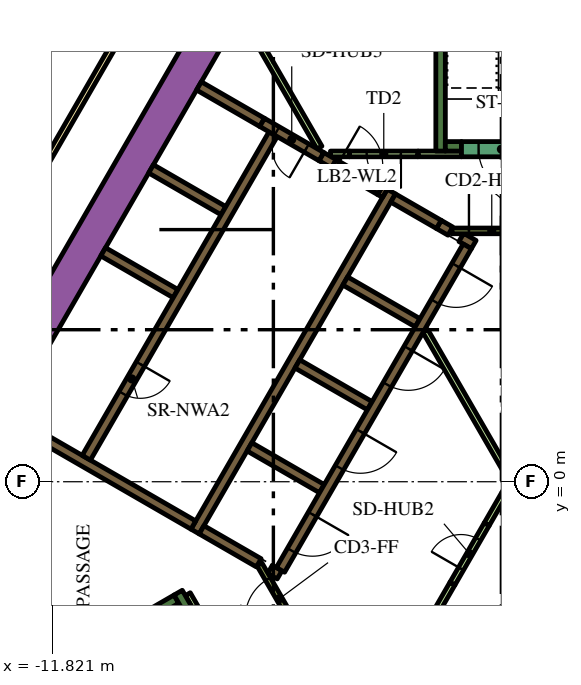
"""IFC4 building model, lengths in metres.
Left out: names, types, materials, properties, quantities, classifications, styles, units other than length and angle.
Written with IfcOpenShell. Run it as: python <this file> out.ifc"""

import sys

from ifc_helpers import new_model, si_unit, direction, frame, frame_2d, origin, place, context, subcontext, project, spatial, polyline, rectangle, outline, extrude, element, fill, save


model = new_model("IFC4")
c1 = context("Model", 3, precision=1e-05, world=origin(), true_north=direction((0.0, 1.0)))
c2 = subcontext(c1, "Body", "Model", "MODEL_VIEW")
j1 = project(units=[si_unit("LENGTHUNIT", "METRE"), si_unit("PLANEANGLEUNIT", "RADIAN")], contexts=[c1])
p1 = place(None, origin())
s1 = spatial("IfcSite", under=j1, at=p1, CompositionType="ELEMENT")
p2 = place(p1, origin())
s2 = spatial("IfcBuilding", under=s1, at=p2, CompositionType="ELEMENT")
p3 = place(p2, frame((0.0, 0.0, 122.7)))
s3 = spatial("IfcBuildingStorey", under=s2, at=p3, CompositionType="ELEMENT", Elevation=122.7)
p4 = place(p3, frame((-15.36, -1.503, 0.0), z_axis=(0.0, 0.0, 1.0), x_axis=(0.50000389221, 0.866023156604, 0.0)))
e1 = element("IfcWall", 1, at=p4, inside=s3, PredefinedType="SOLIDWALL", context=c2, shape_type="SweptSolid", body=[
    extrude(rectangle(XDim=21.0, YDim=0.9, at=frame_2d((10.5, 0.0))), origin(), (0.0, 0.0, 1.0), 3.9),
])
p5 = place(p3, frame((-1.6, 8.7, 0.0), z_axis=(0.0, 0.0, 1.0), x_axis=(0.0, 1.0, 0.0)))
e2 = element("IfcWall", 2, at=p5, inside=s3, PredefinedType="SOLIDWALL", context=c2, shape_type="SweptSolid", body=[
    extrude(rectangle(XDim=7.05, YDim=0.25, at=frame_2d((3.525, 0.0))), origin(), (0.0, 0.0, 1.0), 3.9),
])
p6 = place(p3, frame((-1.475, 8.825, 0.0), z_axis=(0.0, 0.0, 1.0), x_axis=(1.0, 0.0, 0.0)))
e3 = element("IfcWall", 3, at=p6, inside=s3, PredefinedType="SOLIDWALL", context=c2, shape_type="SweptSolid", body=[
    extrude(rectangle(XDim=0.425, YDim=0.25, at=frame_2d((0.212, 0.0))), origin(), (0.0, 0.0, 1.0), 3.9),
])
p7 = place(p3, frame((-14.44, -6.49, 0.0), z_axis=(0.0, 0.0, 1.0), x_axis=(0.866022966069, 0.500004222222, 0.0)))
e4 = element("IfcWall", 4, at=p7, inside=s3, PredefinedType="SOLIDWALL", context=c2, shape_type="SweptSolid", body=[
    extrude(rectangle(XDim=6.8, YDim=0.25, at=frame_2d((3.4, 0.0))), origin(), (0.0, 0.0, 1.0), 3.9),
])
p8 = place(p3, frame((-8.168, -3.503, 0.0), z_axis=(0.0, 0.0, 1.0), x_axis=(-0.499952099219, 0.866053057547, 0.0)))
e5 = element("IfcWall", 5, at=p8, inside=s3, PredefinedType="SOLIDWALL", context=c2, shape_type="SweptSolid", body=[
    extrude(rectangle(XDim=0.675, YDim=0.25, at=frame_2d((0.337, 0.0))), origin(), (0.0, 0.0, 1.0), 3.9),
])
p9 = place(p3, frame((-8.06, -1.311, 0.0), z_axis=(0.0, 0.0, 1.0), x_axis=(0.50000273126, 0.866023826885, 0.0)))
e6 = element("IfcWall", 6, at=p9, inside=s3, PredefinedType="SOLIDWALL", context=c2, shape_type="SweptSolid", body=[
    extrude(rectangle(XDim=10.33, YDim=0.25, at=frame_2d((5.165, 0.0))), origin(), (0.0, 0.0, 1.0), 3.9),
])
p10 = place(p3, frame((-1.342, 6.595, 0.0), z_axis=(0.0, 0.0, 1.0), x_axis=(-0.866046247233, 0.49996389635, 0.0)))
e7 = element("IfcWall", 7, at=p10, inside=s3, PredefinedType="SOLIDWALL", context=c2, shape_type="SweptSolid", body=[
    extrude(rectangle(XDim=0.35, YDim=0.25, at=frame_2d((0.175, 0.0))), origin(), (0.0, 0.0, 1.0), 3.9),
])
p11 = place(p3, frame((-1.647, 6.771, 0.0), z_axis=(0.0, 0.0, 1.0), x_axis=(-0.865971728693, 0.500092956464, 0.0)))
e8 = element("IfcWall", 8, at=p11, inside=s3, PredefinedType="SOLIDWALL", context=c2, shape_type="SweptSolid", body=[
    extrude(rectangle(XDim=1.388, YDim=0.25, at=frame_2d((0.694, 0.0))), origin(), (0.0, 0.0, 1.0), 3.9),
])
p12 = place(p3, frame((-0.728, 6.24, 0.0), z_axis=(0.0, 0.0, 1.0), x_axis=(-0.866088799389, 0.499890179513, 0.0)))
e9 = element("IfcWall", 9, at=p12, inside=s3, PredefinedType="SOLIDWALL", context=c2, shape_type="SweptSolid", body=[
    extrude(rectangle(XDim=0.378, YDim=0.25, at=frame_2d((0.189, 0.0))), origin(), (0.0, 0.0, 1.0), 3.9),
])
for number, where, z_axis, x_axis in (
    (10, (-2.204, 4.182, 0.0), (0.0, 0.0, 1.0), (-0.866, 0.5, 0.0)),
    (11, (-5.369, 3.1, 0.0), (0.0, 0.0, 1.0), (0.866, -0.5, 0.0)),
    (12, (-4.724, -0.182, 0.0), (0.0, 0.0, 1.0), (-0.866, 0.5, 0.0)),
):
    element("IfcWall", number, at=place(p3, frame(where, z_axis=z_axis, x_axis=x_axis)), inside=s3, PredefinedType="SOLIDWALL", context=c2, shape_type="SweptSolid", body=[
        extrude(rectangle(XDim=2.2, YDim=0.25, at=frame_2d((1.1, 0.0))), origin(), (0.0, 0.0, 1.0), 3.9),
    ])
p13 = place(p3, frame((-6.088, -2.305, 0.0), z_axis=(0.0, 0.0, 1.0), x_axis=(0.866059450854, -0.499941024108, 0.0)))
e13 = element("IfcWall", 13, at=p13, inside=s3, PredefinedType="SOLIDWALL", context=c2, shape_type="SweptSolid", body=[
    extrude(rectangle(XDim=0.29, YDim=0.25, at=frame_2d((0.145, 0.0))), origin(), (0.0, 0.0, 1.0), 3.9),
])
p14 = place(p3, frame((-7.889, -1.265, 0.0), z_axis=(0.0, 0.0, 1.0), x_axis=(0.865986741702, -0.500066958712, 0.0)))
e14 = element("IfcWall", 14, at=p14, inside=s3, PredefinedType="SOLIDWALL", context=c2, shape_type="SweptSolid", body=[
    extrude(rectangle(XDim=1.738, YDim=0.25, at=frame_2d((0.869, 0.0))), origin(), (0.0, 0.0, 1.0), 3.9),
])
p15 = place(p3, frame((-8.106, -1.14, 0.0), z_axis=(0.0, 0.0, 1.0), x_axis=(-0.866000643155, 0.500042884217, 0.0)))
e15 = element("IfcWall", 15, at=p15, inside=s3, PredefinedType="SOLIDWALL", context=c2, shape_type="SweptSolid", body=[
    extrude(rectangle(XDim=5.65, YDim=0.25, at=frame_2d((2.825, 0.0))), origin(), (0.0, 0.0, 1.0), 3.9),
])
p16 = place(p3, origin())
e16 = element("IfcWall", 16, at=p16, inside=s3, PredefinedType="SOLIDWALL", context=c2, shape_type="SweptSolid", body=[
    extrude(outline(polyline([(-3.128, 7.481), (-3.259, 7.557), (-3.134, 7.773), (-3.003, 7.698), (-3.128, 7.481)])), origin(), (0.0, 0.0, 1.0), 3.9),
])
for number, where, z_axis, x_axis in (
    (17, (-8.574, 4.95, 0.0), (0.0, 0.0, 1.0), (-0.866, 0.5, 0.0)),
    (18, (-7.314, 7.132, 0.0), (0.0, 0.0, 1.0), (-0.866, 0.5, 0.0)),
):
    element("IfcWall", number, at=place(p3, frame(where, z_axis=z_axis, x_axis=x_axis)), inside=s3, PredefinedType="SOLIDWALL", context=c2, shape_type="SweptSolid", body=[
        extrude(rectangle(XDim=2.2, YDim=0.25, at=frame_2d((1.1, 0.0))), origin(), (0.0, 0.0, 1.0), 3.9),
    ])
p17 = place(p3, frame((-6.296, 9.455, 0.0), z_axis=(0.0, 0.0, 1.0), x_axis=(-0.866011930837, 0.500023335103, 0.0)))
e19 = element("IfcWall", 19, at=p17, inside=s3, PredefinedType="SOLIDWALL", context=c2, shape_type="SweptSolid", body=[
    extrude(rectangle(XDim=1.92, YDim=0.25, at=frame_2d((0.96, 0.0))), origin(), (0.0, 0.0, 1.0), 3.9),
])
p18 = place(p3, frame((-4.409, 8.365, 0.0), z_axis=(0.0, 0.0, 1.0), x_axis=(-0.866057014183, 0.499945245186, 0.0)))
e20 = element("IfcWall", 20, at=p18, inside=s3, PredefinedType="SOLIDWALL", context=c2, shape_type="SweptSolid", body=[
    extrude(rectangle(XDim=0.379, YDim=0.25, at=frame_2d((0.19, 0.0))), origin(), (0.0, 0.0, 1.0), 3.9),
])
p19 = place(p3, frame((-1.887, -3.718, 0.0), z_axis=(0.0, 0.0, 1.0), x_axis=(0.500057179532, 0.865992388649, 0.0)))
e21 = element("IfcWall", 21, at=p19, inside=s3, PredefinedType="PARTITIONING", context=c2, shape_type="SweptSolid", body=[
    extrude(rectangle(XDim=1.199, YDim=0.15, at=frame_2d((0.6, 0.0))), origin(), (0.0, 0.0, 1.0), 2.75),
])
p20 = place(p3, frame((-8.252, -2.958, 0.0), z_axis=(0.0, 0.0, 1.0), x_axis=(0.500174715838, -0.865924508047, 0.0)))
e22 = element("IfcWall", 22, at=p20, inside=s3, PredefinedType="PARTITIONING", context=c2, shape_type="SweptSolid", body=[
    extrude(rectangle(XDim=0.514, YDim=0.15, at=frame_2d((0.257, 0.0))), origin(), (0.0, 0.0, 1.0), 2.75),
])
p21 = place(p3, frame((-2.195, 8.625, 0.0), z_axis=(0.0, 0.0, 1.0), x_axis=(1.0, 0.0, 0.0)))
e23 = element("IfcWall", 23, at=p21, inside=s3, PredefinedType="PARTITIONING", context=c2, shape_type="SweptSolid", body=[
    extrude(rectangle(XDim=1.145, YDim=0.15, at=frame_2d((0.573, 0.0))), origin(), (0.0, 0.0, 1.0), 2.75),
])
p22 = place(p3, frame((-6.823, 12.318, 0.0), z_axis=(0.0, 0.0, 1.0), x_axis=(0.500007885066, -0.866020851292, 0.0)))
e24 = element("IfcWall", 24, at=p22, inside=s3, PredefinedType="PARTITIONING", context=c2, shape_type="SweptSolid", body=[
    extrude(rectangle(XDim=4.072, YDim=0.15, at=frame_2d((2.036, 0.0))), origin(), (0.0, 0.0, 1.0), 2.75),
])
p23 = place(p3, frame((-4.498, 8.625, 0.0), z_axis=(0.0, 0.0, 1.0), x_axis=(1.0, 0.0, 0.0)))
e25 = element("IfcWall", 25, at=p23, inside=s3, PredefinedType="PARTITIONING", context=c2, shape_type="SweptSolid", body=[
    extrude(rectangle(XDim=0.502, YDim=0.15, at=frame_2d((0.251, 0.0))), origin(), (0.0, 0.0, 1.0), 2.75),
])
p24 = place(p3, frame((2.435, -3.718, 0.0), z_axis=(0.0, 0.0, 1.0), x_axis=(-0.499985176046, 0.866033962229, 0.0)))
e26 = element("IfcWall", 26, at=p24, inside=s3, PredefinedType="PARTITIONING", context=c2, shape_type="SweptSolid", body=[
    extrude(rectangle(XDim=8.875, YDim=0.15, at=frame_2d((4.438, 0.0))), origin(), (0.0, 0.0, 1.0), 2.75),
])
p25 = place(p3, frame((-0.387, -1.121, 0.0), z_axis=(0.0, 0.0, 1.0), x_axis=(0.500057179532, 0.865992388649, 0.0)))
e27 = element("IfcWall", 27, at=p25, inside=s3, PredefinedType="PARTITIONING", context=c2, shape_type="SweptSolid", body=[
    extrude(rectangle(XDim=1.199, YDim=0.15, at=frame_2d((0.6, 0.0))), origin(), (0.0, 0.0, 1.0), 2.75),
])
p26 = place(p3, frame((-6.008, 9.144, 0.0), z_axis=(0.0, 0.0, 1.0), x_axis=(-0.500006956611, -0.866021387346, 0.0)))
e28 = element("IfcWall", 28, at=p26, inside=s3, PredefinedType="SOLIDWALL", context=c2, shape_type="SweptSolid", body=[
    extrude(rectangle(XDim=9.83, YDim=0.25, at=frame_2d((4.915, 0.0))), origin(), (0.0, 0.0, 1.0), 3.9),
])
p27 = place(p26, frame((6.985, 0.0, 0.0)))
e29 = element("IfcOpeningElement", 29, at=p27, cuts=e28, PredefinedType="OPENING", context=c2, shape_type="SweptSolid", body=[
    extrude(rectangle(XDim=0.9, YDim=2.1, at=frame_2d((0.45, 1.05))), frame((0.0, 0.135, 0.0), z_axis=(0.0, -1.0, 0.0), x_axis=(1.0, 0.0, 0.0)), (0.0, 0.0, 1.0), 0.27),
])
p28 = place(p3, frame((-0.898, 6.194, 0.0), z_axis=(0.0, 0.0, 1.0), x_axis=(-0.499996202215, -0.866027596426, 0.0)))
e30 = element("IfcWall", 30, at=p28, inside=s3, PredefinedType="SOLIDWALL", context=c2, shape_type="SweptSolid", body=[
    extrude(rectangle(XDim=9.83, YDim=0.25, at=frame_2d((4.915, 0.0))), origin(), (0.0, 0.0, 1.0), 3.9),
])
p29 = place(p28, frame((0.585, 0.0, 0.0)))
e31 = element("IfcOpeningElement", 31, at=p29, cuts=e30, PredefinedType="OPENING", context=c2, shape_type="SweptSolid", body=[
    extrude(rectangle(XDim=1.1, YDim=2.1, at=frame_2d((0.55, 1.05))), frame((0.0, 0.135, 0.0), z_axis=(0.0, -1.0, 0.0), x_axis=(1.0, 0.0, 0.0)), (0.0, 0.0, 1.0), 0.27),
])
p30 = place(p28, frame((3.105, 0.0, 0.0)))
e32 = element("IfcOpeningElement", 32, at=p30, cuts=e30, PredefinedType="OPENING", context=c2, shape_type="SweptSolid", body=[
    extrude(rectangle(XDim=1.1, YDim=2.1, at=frame_2d((0.55, 1.05))), frame((0.0, 0.135, 0.0), z_axis=(0.0, -1.0, 0.0), x_axis=(1.0, 0.0, 0.0)), (0.0, 0.0, 1.0), 0.27),
])
p31 = place(p28, frame((5.625, 0.0, 0.0)))
e33 = element("IfcOpeningElement", 33, at=p31, cuts=e30, PredefinedType="OPENING", context=c2, shape_type="SweptSolid", body=[
    extrude(rectangle(XDim=1.1, YDim=2.1, at=frame_2d((0.55, 1.05))), frame((0.0, 0.135, 0.0), z_axis=(0.0, -1.0, 0.0), x_axis=(1.0, 0.0, 0.0)), (0.0, 0.0, 1.0), 0.27),
])
p32 = place(p28, frame((8.145, 0.0, 0.0)))
e34 = element("IfcOpeningElement", 34, at=p32, cuts=e30, PredefinedType="OPENING", context=c2, shape_type="SweptSolid", body=[
    extrude(rectangle(XDim=1.1, YDim=2.1, at=frame_2d((0.55, 1.05))), frame((0.0, 0.135, 0.0), z_axis=(0.0, -1.0, 0.0), x_axis=(1.0, 0.0, 0.0)), (0.0, 0.0, 1.0), 0.27),
])
p33 = place(p3, frame((1.05, 8.75, 0.0), z_axis=(0.0, 0.0, 1.0), x_axis=(-1.0, 0.0, 0.0)))
e35 = element("IfcWall", 35, at=p33, inside=s3, PredefinedType="SOLIDWALL", context=c2, shape_type="SweptSolid", body=[
    extrude(rectangle(XDim=2.1, YDim=0.4, at=frame_2d((1.05, 0.0))), origin(), (0.0, 0.0, 1.0), 3.9),
])
p34 = place(p33, frame((0.45, 0.0, 0.0)))
e36 = element("IfcOpeningElement", 36, at=p34, cuts=e35, PredefinedType="OPENING", context=c2, shape_type="SweptSolid", body=[
    extrude(rectangle(XDim=1.2, YDim=2.1, at=frame_2d((0.6, 1.05))), frame((0.0, 0.21, 0.0), z_axis=(0.0, -1.0, 0.0), x_axis=(1.0, 0.0, 0.0)), (0.0, 0.0, 1.0), 0.42),
])
p35 = place(p3, frame((-2.195, 8.625, 0.0), z_axis=(0.0, 0.0, 1.0), x_axis=(-1.0, 0.0, 0.0)))
e37 = element("IfcWall", 37, at=p35, inside=s3, PredefinedType="PARTITIONING", context=c2, shape_type="SweptSolid", body=[
    extrude(rectangle(XDim=1.8, YDim=0.15, at=frame_2d((0.9, 0.0))), origin(), (0.0, 0.0, 1.0), 2.75),
])
p36 = place(p35, frame((0.45, 0.0, 0.0)))
e38 = element("IfcOpeningElement", 38, at=p36, cuts=e37, PredefinedType="OPENING", context=c2, shape_type="SweptSolid", body=[
    extrude(rectangle(XDim=0.9, YDim=2.1, at=frame_2d((0.45, 1.05))), frame((0.0, 0.085, 0.0), z_axis=(0.0, -1.0, 0.0), x_axis=(1.0, 0.0, 0.0)), (0.0, 0.0, 1.0), 0.17),
])
p37 = place(p3, frame((-1.303, 6.6, 0.0), z_axis=(0.0, 0.0, 1.0), x_axis=(1.0, 0.0, 0.0)))
e39 = element("IfcWall", 39, at=p37, inside=s3, PredefinedType="PARTITIONING", context=c2, shape_type="SweptSolid", body=[
    extrude(rectangle(XDim=2.1, YDim=0.15, at=frame_2d((1.05, 0.0))), origin(), (0.0, 0.0, 1.0), 3.9),
])
p38 = place(p37, frame((0.45, 0.0, 0.0)))
e40 = element("IfcOpeningElement", 40, at=p38, cuts=e39, PredefinedType="OPENING", context=c2, shape_type="SweptSolid", body=[
    extrude(rectangle(XDim=1.2, YDim=2.1, at=frame_2d((0.6, 1.05))), frame((0.0, 0.085, 0.0), z_axis=(0.0, -1.0, 0.0), x_axis=(1.0, 0.0, 0.0)), (0.0, 0.0, 1.0), 0.17),
])
p39 = place(p3, frame((-5.317, -3.99, 0.0), z_axis=(0.0, 0.0, 1.0), x_axis=(-0.500027713859, 0.866009402589, 0.0)))
e41 = element("IfcWall", 41, at=p39, inside=s3, PredefinedType="PARTITIONING", context=c2, shape_type="SweptSolid", body=[
    extrude(rectangle(XDim=2.1, YDim=0.15, at=frame_2d((1.05, 0.0))), origin(), (0.0, 0.0, 1.0), 3.9),
])
p40 = place(p39, frame((0.45, 0.0, 0.0)))
e42 = element("IfcOpeningElement", 42, at=p40, cuts=e41, PredefinedType="OPENING", context=c2, shape_type="SweptSolid", body=[
    extrude(rectangle(XDim=1.2, YDim=2.1, at=frame_2d((0.6, 1.05))), frame((0.0, 0.085, 0.0), z_axis=(0.0, -1.0, 0.0), x_axis=(1.0, 0.0, 0.0)), (0.0, 0.0, 1.0), 0.17),
])
p41 = place(p3, frame((-4.409, 8.365, 0.0), z_axis=(0.0, 0.0, 1.0), x_axis=(0.866034573852, -0.49998411664, 0.0)))
e43 = element("IfcWall", 43, at=p41, inside=s3, PredefinedType="SOLIDWALL", context=c2, shape_type="SweptSolid", body=[
    extrude(rectangle(XDim=1.4, YDim=0.25, at=frame_2d((0.7, 0.0))), origin(), (0.0, 0.0, 1.0), 3.9),
])
p42 = place(p41, frame((0.1, 0.0, 0.0)))
e44 = element("IfcOpeningElement", 44, at=p42, cuts=e43, PredefinedType="OPENING", context=c2, shape_type="SweptSolid", body=[
    extrude(rectangle(XDim=1.2, YDim=2.1, at=frame_2d((0.6, 1.05))), frame((0.0, 0.135, 0.0), z_axis=(0.0, -1.0, 0.0), x_axis=(1.0, 0.0, 0.0)), (0.0, 0.0, 1.0), 0.27),
])
p43 = place(p3, frame((-1.287, -2.679, 0.0), z_axis=(0.0, 0.0, 1.0), x_axis=(0.499961193289, 0.866047807691, 0.0)))
e45 = element("IfcWall", 45, at=p43, inside=s3, PredefinedType="PARTITIONING", context=c2, shape_type="SweptSolid", body=[
    extrude(rectangle(XDim=1.8, YDim=0.15, at=frame_2d((0.9, 0.0))), origin(), (0.0, 0.0, 1.0), 2.75),
])
p44 = place(p43, frame((0.45, 0.0, 0.0)))
e46 = element("IfcOpeningElement", 46, at=p44, cuts=e45, PredefinedType="OPENING", context=c2, shape_type="SweptSolid", body=[
    extrude(rectangle(XDim=0.9, YDim=2.1, at=frame_2d((0.45, 1.05))), frame((0.0, 0.085, 0.0), z_axis=(0.0, -1.0, 0.0), x_axis=(1.0, 0.0, 0.0)), (0.0, 0.0, 1.0), 0.17),
])
p45 = place(p3, frame((-4.737, 8.555, 0.0), z_axis=(0.0, 0.0, 1.0), x_axis=(-0.865989075817, 0.500062916607, 0.0)))
e47 = element("IfcWall", 47, at=p45, inside=s3, PredefinedType="SOLIDWALL", context=c2, shape_type="SweptSolid", body=[
    extrude(rectangle(XDim=1.8, YDim=0.25, at=frame_2d((0.9, 0.0))), origin(), (0.0, 0.0, 1.0), 3.9),
])
p46 = place(p45, frame((0.45, 0.0, 0.0)))
e48 = element("IfcOpeningElement", 48, at=p46, cuts=e47, PredefinedType="OPENING", context=c2, shape_type="SweptSolid", body=[
    extrude(rectangle(XDim=0.9, YDim=2.1, at=frame_2d((0.45, 1.05))), frame((0.0, 0.135, 0.0), z_axis=(0.0, -1.0, 0.0), x_axis=(1.0, 0.0, 0.0)), (0.0, 0.0, 1.0), 0.27),
])
p47 = place(p3, frame((-19.081, -3.9, 0.0), z_axis=(0.0, 0.0, 1.0), x_axis=(0.499998313975, 0.866026377209, 0.0)))
e49 = element("IfcWall", 49, at=p47, inside=s3, PredefinedType="PARTITIONING", context=c2, shape_type="SweptSolid", body=[
    extrude(rectangle(XDim=25.766, YDim=0.15, at=frame_2d((12.883, 0.0))), origin(), (0.0, 0.0, 1.0), 2.75),
])
p48 = place(p47, frame((19.306, 0.0, 0.0)))
e50 = element("IfcOpeningElement", 50, at=p48, cuts=e49, PredefinedType="OPENING", context=c2, shape_type="SweptSolid", body=[
    extrude(rectangle(XDim=1.0, YDim=2.1, at=frame_2d((0.5, 1.05))), frame((0.0, 0.085, 0.0), z_axis=(0.0, -1.0, 0.0), x_axis=(1.0, 0.0, 0.0)), (0.0, 0.0, 1.0), 0.17),
])
p49 = place(p47, frame((18.0, 0.0, 0.0)))
e51 = element("IfcOpeningElement", 51, at=p49, cuts=e49, PredefinedType="OPENING", context=c2, shape_type="SweptSolid", body=[
    extrude(rectangle(XDim=1.0, YDim=2.1, at=frame_2d((0.5, 1.05))), frame((0.0, 0.085, 0.0), z_axis=(0.0, -1.0, 0.0), x_axis=(1.0, 0.0, 0.0)), (0.0, 0.0, 1.0), 0.17),
])
p50 = place(p47, frame((7.793, 0.0, 0.0)))
e52 = element("IfcOpeningElement", 52, at=p50, cuts=e49, PredefinedType="OPENING", context=c2, shape_type="SweptSolid", body=[
    extrude(rectangle(XDim=0.9, YDim=2.1, at=frame_2d((0.45, 1.05))), frame((0.0, 0.085, 0.0), z_axis=(0.0, -1.0, 0.0), x_axis=(1.0, 0.0, 0.0)), (0.0, 0.0, 1.0), 0.17),
])
p51 = place(p47, frame((4.674, 0.0, 0.0)))
e53 = element("IfcOpeningElement", 53, at=p51, cuts=e49, PredefinedType="OPENING", context=c2, shape_type="SweptSolid", body=[
    extrude(rectangle(XDim=0.9, YDim=2.1, at=frame_2d((0.45, 1.05))), frame((0.0, 0.085, 0.0), z_axis=(0.0, -1.0, 0.0), x_axis=(1.0, 0.0, 0.0)), (0.0, 0.0, 1.0), 0.17),
])
p52 = place(p47, frame((0.18, 0.0, 0.0)))
e54 = element("IfcOpeningElement", 54, at=p52, cuts=e49, PredefinedType="OPENING", context=c2, shape_type="SweptSolid", body=[
    extrude(rectangle(XDim=1.0, YDim=2.1, at=frame_2d((0.5, 1.05))), frame((0.0, 0.085, 0.0), z_axis=(0.0, -1.0, 0.0), x_axis=(1.0, 0.0, 0.0)), (0.0, 0.0, 1.0), 0.17),
])
p53 = place(p27, origin())
e55 = element("IfcDoor", 55, at=p53, inside=s3, OperationType="SINGLE_SWING_LEFT", PredefinedType="DOOR", context=c2, shape_type="SweptSolid", body=[
    extrude(rectangle(XDim=0.9, YDim=2.1, at=frame_2d((0.45, 1.05))), frame((0.0, 0.025, 0.0), z_axis=(0.0, -1.0, 0.0), x_axis=(1.0, 0.0, 0.0)), (0.0, 0.0, 1.0), 0.05),
])
fill(e29, e55)
p54 = place(p29, origin())
e56 = element("IfcDoor", 56, at=p54, inside=s3, OperationType="DOUBLE_DOOR_SLIDING", PredefinedType="DOOR", context=c2, shape_type="SweptSolid", body=[
    extrude(rectangle(XDim=1.1, YDim=2.1, at=frame_2d((0.55, 1.05))), frame((0.0, 0.025, 0.0), z_axis=(0.0, -1.0, 0.0), x_axis=(1.0, 0.0, 0.0)), (0.0, 0.0, 1.0), 0.05),
])
fill(e31, e56)
p55 = place(p30, origin())
e57 = element("IfcDoor", 57, at=p55, inside=s3, OperationType="DOUBLE_DOOR_SLIDING", PredefinedType="DOOR", context=c2, shape_type="SweptSolid", body=[
    extrude(rectangle(XDim=1.1, YDim=2.1, at=frame_2d((0.55, 1.05))), frame((0.0, 0.025, 0.0), z_axis=(0.0, -1.0, 0.0), x_axis=(1.0, 0.0, 0.0)), (0.0, 0.0, 1.0), 0.05),
])
fill(e32, e57)
p56 = place(p31, origin())
e58 = element("IfcDoor", 58, at=p56, inside=s3, OperationType="DOUBLE_DOOR_SLIDING", PredefinedType="DOOR", context=c2, shape_type="SweptSolid", body=[
    extrude(rectangle(XDim=1.1, YDim=2.1, at=frame_2d((0.55, 1.05))), frame((0.0, 0.025, 0.0), z_axis=(0.0, -1.0, 0.0), x_axis=(1.0, 0.0, 0.0)), (0.0, 0.0, 1.0), 0.05),
])
fill(e33, e58)
p57 = place(p32, origin())
e59 = element("IfcDoor", 59, at=p57, inside=s3, OperationType="DOUBLE_DOOR_SLIDING", PredefinedType="DOOR", context=c2, shape_type="SweptSolid", body=[
    extrude(rectangle(XDim=1.1, YDim=2.1, at=frame_2d((0.55, 1.05))), frame((0.0, 0.025, 0.0), z_axis=(0.0, -1.0, 0.0), x_axis=(1.0, 0.0, 0.0)), (0.0, 0.0, 1.0), 0.05),
])
fill(e34, e59)
p58 = place(p34, origin())
e60 = element("IfcDoor", 60, at=p58, inside=s3, OperationType="SINGLE_SWING_LEFT", PredefinedType="DOOR", context=c2, shape_type="SweptSolid", body=[
    extrude(rectangle(XDim=1.2, YDim=2.1, at=frame_2d((0.6, 1.05))), frame((0.0, 0.025, 0.0), z_axis=(0.0, -1.0, 0.0), x_axis=(1.0, 0.0, 0.0)), (0.0, 0.0, 1.0), 0.05),
])
fill(e36, e60)
p59 = place(p36, origin())
e61 = element("IfcDoor", 61, at=p59, inside=s3, OperationType="SINGLE_SWING_LEFT", PredefinedType="DOOR", context=c2, shape_type="SweptSolid", body=[
    extrude(rectangle(XDim=0.9, YDim=2.1, at=frame_2d((0.45, 1.05))), frame((0.0, 0.025, 0.0), z_axis=(0.0, -1.0, 0.0), x_axis=(1.0, 0.0, 0.0)), (0.0, 0.0, 1.0), 0.05),
])
fill(e38, e61)
p60 = place(p38, origin())
e62 = element("IfcDoor", 62, at=p60, inside=s3, OperationType="SINGLE_SWING_LEFT", PredefinedType="DOOR", context=c2, shape_type="SweptSolid", body=[
    extrude(rectangle(XDim=1.2, YDim=2.1, at=frame_2d((0.6, 1.05))), frame((0.0, 0.025, 0.0), z_axis=(0.0, -1.0, 0.0), x_axis=(1.0, 0.0, 0.0)), (0.0, 0.0, 1.0), 0.05),
])
fill(e40, e62)
p61 = place(p40, origin())
e63 = element("IfcDoor", 63, at=p61, inside=s3, OperationType="SINGLE_SWING_LEFT", PredefinedType="DOOR", context=c2, shape_type="SweptSolid", body=[
    extrude(rectangle(XDim=1.2, YDim=2.1, at=frame_2d((0.6, 1.05))), frame((0.0, 0.025, 0.0), z_axis=(0.0, -1.0, 0.0), x_axis=(1.0, 0.0, 0.0)), (0.0, 0.0, 1.0), 0.05),
])
fill(e42, e63)
p62 = place(p42, origin())
e64 = element("IfcDoor", 64, at=p62, inside=s3, OperationType="SINGLE_SWING_LEFT", PredefinedType="DOOR", context=c2, shape_type="SweptSolid", body=[
    extrude(rectangle(XDim=1.2, YDim=2.1, at=frame_2d((0.6, 1.05))), frame((0.0, 0.025, 0.0), z_axis=(0.0, -1.0, 0.0), x_axis=(1.0, 0.0, 0.0)), (0.0, 0.0, 1.0), 0.05),
])
fill(e44, e64)
p63 = place(p44, origin())
e65 = element("IfcDoor", 65, at=p63, inside=s3, OperationType="SINGLE_SWING_LEFT", PredefinedType="DOOR", context=c2, shape_type="SweptSolid", body=[
    extrude(rectangle(XDim=0.9, YDim=2.1, at=frame_2d((0.45, 1.05))), frame((0.0, 0.025, 0.0), z_axis=(0.0, -1.0, 0.0), x_axis=(1.0, 0.0, 0.0)), (0.0, 0.0, 1.0), 0.05),
])
fill(e46, e65)
p64 = place(p46, origin())
e66 = element("IfcDoor", 66, at=p64, inside=s3, OperationType="SINGLE_SWING_LEFT", PredefinedType="DOOR", context=c2, shape_type="SweptSolid", body=[
    extrude(rectangle(XDim=0.9, YDim=2.1, at=frame_2d((0.45, 1.05))), frame((0.0, 0.025, 0.0), z_axis=(0.0, -1.0, 0.0), x_axis=(1.0, 0.0, 0.0)), (0.0, 0.0, 1.0), 0.05),
])
fill(e48, e66)
save(model, sys.argv[1])
